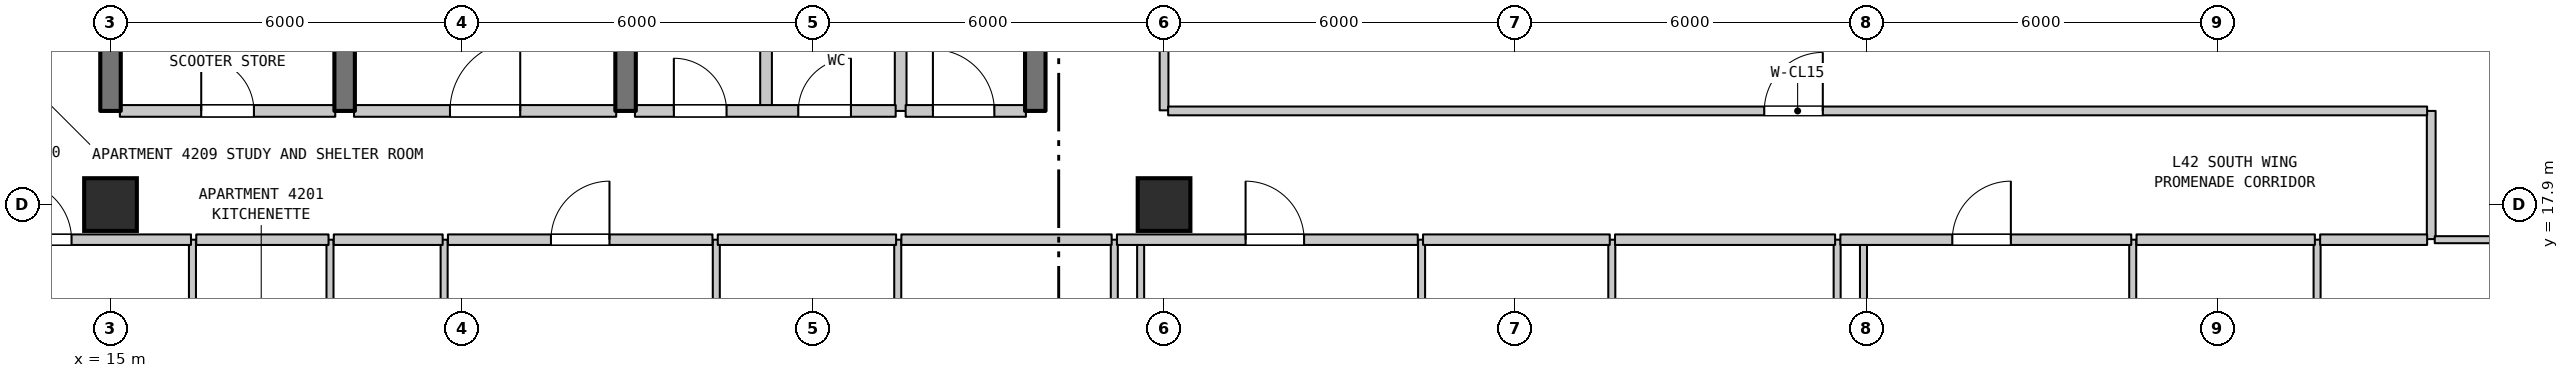
"""IFC4 building model, lengths in metres.
Left out: names, types, materials, properties, quantities, classifications, styles, units other than length and angle.
Written with IfcOpenShell. Run it as: python <this file> out.ifc"""

import sys

from ifc_helpers import new_model, si_unit, direction, frame, frame_2d, origin, origin_2d, place, context, subcontext, project, spatial, rectangle, extrude, element, fill, save


model = new_model("IFC4")
c1 = context("Model", 3, precision=1e-05, world=origin(), true_north=direction((0.0, 1.0)))
c2 = subcontext(c1, "Body", "Model", "MODEL_VIEW")
j1 = project(units=[si_unit("LENGTHUNIT", "METRE"), si_unit("PLANEANGLEUNIT", "RADIAN")], contexts=[c1])
p1 = place(None, origin())
s1 = spatial("IfcSite", under=j1, at=p1, CompositionType="ELEMENT")
p2 = place(p1, origin())
s2 = spatial("IfcBuilding", under=s1, at=p2, CompositionType="ELEMENT")
p3 = place(p2, frame((0.0, 0.0, 172.8)))
s3 = spatial("IfcBuildingStorey", under=s2, at=p3, CompositionType="ELEMENT", Elevation=172.8)
for number, where, z_axis, x_axis in (
    (1, (15.0, 17.9, 0.0), (0.0, 0.0, 1.0), (1.0, 0.0, 0.0)),
    (2, (33.0, 17.9, 0.0), (0.0, 0.0, 1.0), (1.0, 0.0, 0.0)),
):
    element("IfcColumn", number, at=place(p3, frame(where, z_axis=z_axis, x_axis=x_axis)), inside=s3, PredefinedType="COLUMN", context=c2, shape_type="SweptSolid", body=[
        extrude(rectangle(XDim=0.9, YDim=0.9, at=origin_2d()), origin(), (0.0, 0.0, 1.0), 3.7),
    ])
p4 = place(p3, frame((15.0, 19.5, 0.0), z_axis=(0.0, 0.0, 1.0), x_axis=(0.0, 1.0, 0.0)))
e3 = element("IfcWall", 3, at=p4, inside=s3, PredefinedType="SHEAR", context=c2, shape_type="SweptSolid", body=[
    extrude(rectangle(XDim=3.2, YDim=0.35, at=frame_2d((1.6, 0.0))), origin(), (0.0, 0.0, 1.0), 3.39),
])
p5 = place(p3, frame((16.4, 14.1, 0.0), z_axis=(0.0, 0.0, 1.0), x_axis=(0.0, 1.0, 0.0)))
e4 = element("IfcWall", 4, at=p5, inside=s3, PredefinedType="PARTITIONING", context=c2, shape_type="SweptSolid", body=[
    extrude(rectangle(XDim=3.2, YDim=0.12, at=frame_2d((1.6, 0.0))), origin(), (0.0, 0.0, 1.0), 3.39),
])
p6 = place(p5, frame((1.15, 0.0, 0.0)))
e5 = element("IfcOpeningElement", 5, at=p6, cuts=e4, PredefinedType="OPENING", context=c2, shape_type="SweptSolid", body=[
    extrude(rectangle(XDim=0.9, YDim=2.15, at=frame_2d((0.45, 1.075))), frame((0.0, 0.07, 0.0), z_axis=(0.0, -1.0, 0.0), x_axis=(1.0, 0.0, 0.0)), (0.0, 0.0, 1.0), 0.14),
])
p7 = place(p3, frame((18.75, 14.1, 0.0), z_axis=(0.0, 0.0, 1.0), x_axis=(0.0, 1.0, 0.0)))
e6 = element("IfcWall", 6, at=p7, inside=s3, PredefinedType="PARTITIONING", context=c2, shape_type="SweptSolid", body=[
    extrude(rectangle(XDim=3.2, YDim=0.12, at=frame_2d((1.6, 0.0))), origin(), (0.0, 0.0, 1.0), 3.39),
])
p8 = place(p3, frame((19.0, 19.5, 0.0), z_axis=(0.0, 0.0, 1.0), x_axis=(0.0, 1.0, 0.0)))
e7 = element("IfcWall", 7, at=p8, inside=s3, PredefinedType="SHEAR", context=c2, shape_type="SweptSolid", body=[
    extrude(rectangle(XDim=3.2, YDim=0.35, at=frame_2d((1.6, 0.0))), origin(), (0.0, 0.0, 1.0), 3.39),
])
p9 = place(p3, frame((20.7, 6.977, 0.0), z_axis=(0.0, 0.0, 1.0), x_axis=(0.0, 1.0, 0.0)))
e8 = element("IfcWall", 8, at=p9, inside=s3, PredefinedType="PARTITIONING", context=c2, shape_type="SweptSolid", body=[
    extrude(rectangle(XDim=10.323, YDim=0.12, at=frame_2d((5.162, 0.0))), origin(), (0.0, 0.0, 1.0), 3.39),
])
p10 = place(p3, frame((23.8, 19.5, 0.0), z_axis=(0.0, 0.0, 1.0), x_axis=(0.0, 1.0, 0.0)))
e9 = element("IfcWall", 9, at=p10, inside=s3, PredefinedType="SHEAR", context=c2, shape_type="SweptSolid", body=[
    extrude(rectangle(XDim=3.2, YDim=0.35, at=frame_2d((1.6, 0.0))), origin(), (0.0, 0.0, 1.0), 3.39),
])
p11 = place(p3, frame((25.35, 11.15, 0.0), z_axis=(0.0, 0.0, 1.0), x_axis=(0.0, 1.0, 0.0)))
e10 = element("IfcWall", 10, at=p11, inside=s3, PredefinedType="PARTITIONING", context=c2, shape_type="SweptSolid", body=[
    extrude(rectangle(XDim=6.15, YDim=0.12, at=frame_2d((3.075, 0.0))), origin(), (0.0, 0.0, 1.0), 3.39),
])
p12 = place(p3, frame((26.2, 19.5, 0.0), z_axis=(0.0, 0.0, 1.0), x_axis=(0.0, 1.0, 0.0)))
e11 = element("IfcWall", 11, at=p12, inside=s3, PredefinedType="STANDARD", context=c2, shape_type="SweptSolid", body=[
    extrude(rectangle(XDim=3.2, YDim=0.2, at=frame_2d((1.6, 0.0))), origin(), (0.0, 0.0, 1.0), 3.39),
])
p13 = place(p3, frame((28.45, 11.15, 0.0), z_axis=(0.0, 0.0, 1.0), x_axis=(0.0, 1.0, 0.0)))
e12 = element("IfcWall", 12, at=p13, inside=s3, PredefinedType="PARTITIONING", context=c2, shape_type="SweptSolid", body=[
    extrude(rectangle(XDim=6.15, YDim=0.12, at=frame_2d((3.075, 0.0))), origin(), (0.0, 0.0, 1.0), 3.39),
])
p14 = place(p3, frame((28.5, 19.5, 0.0), z_axis=(0.0, 0.0, 1.0), x_axis=(0.0, 1.0, 0.0)))
e13 = element("IfcWall", 13, at=p14, inside=s3, PredefinedType="STANDARD", context=c2, shape_type="SweptSolid", body=[
    extrude(rectangle(XDim=3.2, YDim=0.2, at=frame_2d((1.6, 0.0))), origin(), (0.0, 0.0, 1.0), 3.39),
])
p15 = place(p3, frame((30.8, 19.5, 0.0), z_axis=(0.0, 0.0, 1.0), x_axis=(0.0, 1.0, 0.0)))
e14 = element("IfcWall", 14, at=p15, inside=s3, PredefinedType="SHEAR", context=c2, shape_type="SweptSolid", body=[
    extrude(rectangle(XDim=3.2, YDim=0.35, at=frame_2d((1.6, 0.0))), origin(), (0.0, 0.0, 1.0), 3.39),
])
p16 = place(p3, frame((32.15, 11.15, 0.0), z_axis=(0.0, 0.0, 1.0), x_axis=(0.0, 1.0, 0.0)))
e15 = element("IfcWall", 15, at=p16, inside=s3, PredefinedType="PARTITIONING", context=c2, shape_type="SweptSolid", body=[
    extrude(rectangle(XDim=6.15, YDim=0.12, at=frame_2d((3.075, 0.0))), origin(), (0.0, 0.0, 1.0), 3.39),
])
p17 = place(p3, frame((32.6, 14.85, 0.0), z_axis=(0.0, 0.0, 1.0), x_axis=(0.0, 1.0, 0.0)))
e16 = element("IfcWall", 16, at=p17, inside=s3, PredefinedType="PARTITIONING", context=c2, shape_type="SweptSolid", body=[
    extrude(rectangle(XDim=2.45, YDim=0.12, at=frame_2d((1.225, 0.0))), origin(), (0.0, 0.0, 1.0), 3.39),
])
p18 = place(p3, frame((33.0, 19.51, 0.0), z_axis=(0.0, 0.0, 1.0), x_axis=(0.0, 1.0, 0.0)))
e17 = element("IfcWall", 17, at=p18, inside=s3, PredefinedType="STANDARD", context=c2, shape_type="SweptSolid", body=[
    extrude(rectangle(XDim=5.99, YDim=0.15, at=frame_2d((2.995, 0.0))), origin(), (0.0, 0.0, 1.0), 2.99),
])
p19 = place(p18, frame((1.513, 0.0, 0.0)))
e18 = element("IfcOpeningElement", 18, at=p19, cuts=e17, PredefinedType="OPENING", context=c2, shape_type="SweptSolid", body=[
    extrude(rectangle(XDim=1.0, YDim=2.15, at=frame_2d((0.5, 1.075))), frame((0.0, 0.085, 0.0), z_axis=(0.0, -1.0, 0.0), x_axis=(1.0, 0.0, 0.0)), (0.0, 0.0, 1.0), 0.17),
])
for number, where, z_axis, x_axis in (
    (19, (37.4, 11.15, 0.0), (0.0, 0.0, 1.0), (0.0, 1.0, 0.0)),
    (20, (40.65, 11.15, 0.0), (0.0, 0.0, 1.0), (0.0, 1.0, 0.0)),
    (21, (44.5, 11.15, 0.0), (0.0, 0.0, 1.0), (0.0, 1.0, 0.0)),
):
    element("IfcWall", number, at=place(p3, frame(where, z_axis=z_axis, x_axis=x_axis)), inside=s3, PredefinedType="PARTITIONING", context=c2, shape_type="SweptSolid", body=[
        extrude(rectangle(XDim=6.15, YDim=0.12, at=frame_2d((3.075, 0.0))), origin(), (0.0, 0.0, 1.0), 3.39),
    ])
p20 = place(p3, frame((44.95, 0.71, 0.0), z_axis=(0.0, 0.0, 1.0), x_axis=(0.0, 1.0, 0.0)))
e22 = element("IfcWall", 22, at=p20, inside=s3, PredefinedType="PARTITIONING", context=c2, shape_type="SweptSolid", body=[
    extrude(rectangle(XDim=16.59, YDim=0.12, at=frame_2d((8.295, 0.0))), origin(), (0.0, 0.0, 1.0), 3.39),
])
for number, where, z_axis, x_axis in (
    (23, (49.55, 11.15, 0.0), (0.0, 0.0, 1.0), (0.0, 1.0, 0.0)),
    (24, (52.7, 11.15, 0.0), (0.0, 0.0, 1.0), (0.0, 1.0, 0.0)),
):
    element("IfcWall", number, at=place(p3, frame(where, z_axis=z_axis, x_axis=x_axis)), inside=s3, PredefinedType="PARTITIONING", context=c2, shape_type="SweptSolid", body=[
        extrude(rectangle(XDim=6.15, YDim=0.12, at=frame_2d((3.075, 0.0))), origin(), (0.0, 0.0, 1.0), 3.39),
    ])
p21 = place(p3, frame((54.65, 17.31, 0.0), z_axis=(0.0, 0.0, 1.0), x_axis=(0.0, 1.0, 0.0)))
e25 = element("IfcWall", 25, at=p21, inside=s3, PredefinedType="STANDARD", context=c2, shape_type="SweptSolid", body=[
    extrude(rectangle(XDim=2.19, YDim=0.15, at=frame_2d((1.095, 0.0))), origin(), (0.0, 0.0, 1.0), 3.39),
])
p22 = place(p3, frame((12.875, 17.3, 0.0), z_axis=(0.0, 0.0, 1.0), x_axis=(1.0, 0.0, 0.0)))
e26 = element("IfcWall", 26, at=p22, inside=s3, PredefinedType="STANDARD", context=c2, shape_type="SweptSolid", body=[
    extrude(rectangle(XDim=3.5, YDim=0.18, at=frame_2d((1.75, 0.0))), origin(), (0.0, 0.0, 1.0), 3.39),
])
p23 = place(p22, frame((0.459, 0.0, 0.0)))
e27 = element("IfcOpeningElement", 27, at=p23, cuts=e26, PredefinedType="OPENING", context=c2, shape_type="SweptSolid", body=[
    extrude(rectangle(XDim=1.0, YDim=2.15, at=frame_2d((0.5, 1.075))), frame((0.0, 0.1, 0.0), z_axis=(0.0, -1.0, 0.0), x_axis=(1.0, 0.0, 0.0)), (0.0, 0.0, 1.0), 0.2),
])
p24 = place(p3, frame((16.465, 17.3, 0.0), z_axis=(0.0, 0.0, 1.0), x_axis=(1.0, 0.0, 0.0)))
e28 = element("IfcWall", 28, at=p24, inside=s3, PredefinedType="STANDARD", context=c2, shape_type="SweptSolid", body=[
    extrude(rectangle(XDim=2.26, YDim=0.18, at=frame_2d((1.13, 0.0))), origin(), (0.0, 0.0, 1.0), 3.39),
])
p25 = place(p3, frame((18.815, 17.3, 0.0), z_axis=(0.0, 0.0, 1.0), x_axis=(1.0, 0.0, 0.0)))
e29 = element("IfcWall", 29, at=p25, inside=s3, PredefinedType="STANDARD", context=c2, shape_type="SweptSolid", body=[
    extrude(rectangle(XDim=1.86, YDim=0.18, at=frame_2d((0.93, 0.0))), origin(), (0.0, 0.0, 1.0), 3.39),
])
p26 = place(p3, frame((20.765, 17.3, 0.0), z_axis=(0.0, 0.0, 1.0), x_axis=(1.0, 0.0, 0.0)))
e30 = element("IfcWall", 30, at=p26, inside=s3, PredefinedType="STANDARD", context=c2, shape_type="SweptSolid", body=[
    extrude(rectangle(XDim=4.52, YDim=0.18, at=frame_2d((2.26, 0.0))), origin(), (0.0, 0.0, 1.0), 3.39),
])
p27 = place(p26, frame((1.76, 0.0, 0.0)))
e31 = element("IfcOpeningElement", 31, at=p27, cuts=e30, PredefinedType="OPENING", context=c2, shape_type="SweptSolid", body=[
    extrude(rectangle(XDim=1.0, YDim=2.15, at=frame_2d((0.5, 1.075))), frame((0.0, 0.1, 0.0), z_axis=(0.0, -1.0, 0.0), x_axis=(1.0, 0.0, 0.0)), (0.0, 0.0, 1.0), 0.2),
])
p28 = place(p3, frame((25.375, 17.3, 0.0), z_axis=(0.0, 0.0, 1.0), x_axis=(1.0, 0.0, 0.0)))
e32 = element("IfcWall", 32, at=p28, inside=s3, PredefinedType="STANDARD", context=c2, shape_type="SweptSolid", body=[
    extrude(rectangle(XDim=3.047, YDim=0.18, at=frame_2d((1.523, 0.0))), origin(), (0.0, 0.0, 1.0), 3.39),
])
p29 = place(p3, frame((28.512, 17.3, 0.0), z_axis=(0.0, 0.0, 1.0), x_axis=(1.0, 0.0, 0.0)))
e33 = element("IfcWall", 33, at=p29, inside=s3, PredefinedType="STANDARD", context=c2, shape_type="SweptSolid", body=[
    extrude(rectangle(XDim=3.593, YDim=0.18, at=frame_2d((1.796, 0.0))), origin(), (0.0, 0.0, 1.0), 3.39),
])
p30 = place(p3, frame((32.195, 17.3, 0.0), z_axis=(0.0, 0.0, 1.0), x_axis=(1.0, 0.0, 0.0)))
e34 = element("IfcWall", 34, at=p30, inside=s3, PredefinedType="STANDARD", context=c2, shape_type="SweptSolid", body=[
    extrude(rectangle(XDim=5.14, YDim=0.18, at=frame_2d((2.57, 0.0))), origin(), (0.0, 0.0, 1.0), 3.39),
])
p31 = place(p30, frame((2.198, 0.0, 0.0)))
e35 = element("IfcOpeningElement", 35, at=p31, cuts=e34, PredefinedType="OPENING", context=c2, shape_type="SweptSolid", body=[
    extrude(rectangle(XDim=1.0, YDim=2.15, at=frame_2d((0.5, 1.075))), frame((0.0, 0.1, 0.0), z_axis=(0.0, -1.0, 0.0), x_axis=(1.0, 0.0, 0.0)), (0.0, 0.0, 1.0), 0.2),
])
p32 = place(p3, frame((37.425, 17.3, 0.0), z_axis=(0.0, 0.0, 1.0), x_axis=(1.0, 0.0, 0.0)))
e36 = element("IfcWall", 36, at=p32, inside=s3, PredefinedType="STANDARD", context=c2, shape_type="SweptSolid", body=[
    extrude(rectangle(XDim=3.19, YDim=0.18, at=frame_2d((1.595, 0.0))), origin(), (0.0, 0.0, 1.0), 3.39),
])
p33 = place(p3, frame((40.705, 17.3, 0.0), z_axis=(0.0, 0.0, 1.0), x_axis=(1.0, 0.0, 0.0)))
e37 = element("IfcWall", 37, at=p33, inside=s3, PredefinedType="STANDARD", context=c2, shape_type="SweptSolid", body=[
    extrude(rectangle(XDim=3.76, YDim=0.18, at=frame_2d((1.88, 0.0))), origin(), (0.0, 0.0, 1.0), 3.39),
])
p34 = place(p3, frame((44.555, 17.3, 0.0), z_axis=(0.0, 0.0, 1.0), x_axis=(1.0, 0.0, 0.0)))
e38 = element("IfcWall", 38, at=p34, inside=s3, PredefinedType="STANDARD", context=c2, shape_type="SweptSolid", body=[
    extrude(rectangle(XDim=4.97, YDim=0.18, at=frame_2d((2.485, 0.0))), origin(), (0.0, 0.0, 1.0), 3.39),
])
p35 = place(p34, frame((1.913, 0.0, 0.0)))
e39 = element("IfcOpeningElement", 39, at=p35, cuts=e38, PredefinedType="OPENING", context=c2, shape_type="SweptSolid", body=[
    extrude(rectangle(XDim=1.0, YDim=2.15, at=frame_2d((0.5, 1.075))), frame((0.0, 0.1, 0.0), z_axis=(0.0, -1.0, 0.0), x_axis=(1.0, 0.0, 0.0)), (0.0, 0.0, 1.0), 0.2),
])
p36 = place(p3, frame((49.615, 17.3, 0.0), z_axis=(0.0, 0.0, 1.0), x_axis=(1.0, 0.0, 0.0)))
e40 = element("IfcWall", 40, at=p36, inside=s3, PredefinedType="STANDARD", context=c2, shape_type="SweptSolid", body=[
    extrude(rectangle(XDim=3.047, YDim=0.18, at=frame_2d((1.523, 0.0))), origin(), (0.0, 0.0, 1.0), 3.39),
])
p37 = place(p3, frame((52.752, 17.3, 0.0), z_axis=(0.0, 0.0, 1.0), x_axis=(1.0, 0.0, 0.0)))
e41 = element("IfcWall", 41, at=p37, inside=s3, PredefinedType="STANDARD", context=c2, shape_type="SweptSolid", body=[
    extrude(rectangle(XDim=1.828, YDim=0.18, at=frame_2d((0.914, 0.0))), origin(), (0.0, 0.0, 1.0), 3.39),
])
p38 = place(p3, frame((54.71, 17.3, 0.0), z_axis=(0.0, 0.0, 1.0), x_axis=(1.0, 0.0, 0.0)))
e42 = element("IfcWall", 42, at=p38, inside=s3, PredefinedType="PARTITIONING", context=c2, shape_type="SweptSolid", body=[
    extrude(rectangle(XDim=1.635, YDim=0.12, at=frame_2d((0.817, 0.0))), origin(), (0.0, 0.0, 1.0), 3.39),
])
p39 = place(p3, frame((15.16, 19.5, 0.0), z_axis=(0.0, 0.0, 1.0), x_axis=(1.0, 0.0, 0.0)))
e43 = element("IfcWall", 43, at=p39, inside=s3, PredefinedType="STANDARD", context=c2, shape_type="SweptSolid", body=[
    extrude(rectangle(XDim=3.68, YDim=0.2, at=frame_2d((1.84, 0.0))), origin(), (0.0, 0.0, 1.0), 3.39),
])
p40 = place(p39, frame((1.39, 0.0, 0.0)))
e44 = element("IfcOpeningElement", 44, at=p40, cuts=e43, PredefinedType="OPENING", context=c2, shape_type="SweptSolid", body=[
    extrude(rectangle(XDim=0.9, YDim=2.15, at=frame_2d((0.45, 1.075))), frame((0.0, 0.11, 0.0), z_axis=(0.0, -1.0, 0.0), x_axis=(1.0, 0.0, 0.0)), (0.0, 0.0, 1.0), 0.22),
])
p41 = place(p3, frame((19.16, 19.5, 0.0), z_axis=(0.0, 0.0, 1.0), x_axis=(1.0, 0.0, 0.0)))
e45 = element("IfcWall", 45, at=p41, inside=s3, PredefinedType="STANDARD", context=c2, shape_type="SweptSolid", body=[
    extrude(rectangle(XDim=4.48, YDim=0.2, at=frame_2d((2.24, 0.0))), origin(), (0.0, 0.0, 1.0), 3.39),
])
p42 = place(p41, frame((1.64, 0.0, 0.0)))
e46 = element("IfcOpeningElement", 46, at=p42, cuts=e45, PredefinedType="OPENING", context=c2, shape_type="SweptSolid", body=[
    extrude(rectangle(XDim=1.2, YDim=2.2, at=frame_2d((0.6, 1.1))), frame((0.0, 0.11, 0.0), z_axis=(0.0, -1.0, 0.0), x_axis=(1.0, 0.0, 0.0)), (0.0, 0.0, 1.0), 0.22),
])
p43 = place(p3, frame((23.96, 19.5, 0.0), z_axis=(0.0, 0.0, 1.0), x_axis=(1.0, 0.0, 0.0)))
e47 = element("IfcWall", 47, at=p43, inside=s3, PredefinedType="STANDARD", context=c2, shape_type="SweptSolid", body=[
    extrude(rectangle(XDim=4.455, YDim=0.2, at=frame_2d((2.228, 0.0))), origin(), (0.0, 0.0, 1.0), 3.39),
])
p44 = place(p43, frame((0.665, 0.0, 0.0)))
e48 = element("IfcOpeningElement", 48, at=p44, cuts=e47, PredefinedType="OPENING", context=c2, shape_type="SweptSolid", body=[
    extrude(rectangle(XDim=0.9, YDim=2.15, at=frame_2d((0.45, 1.075))), frame((0.0, 0.11, 0.0), z_axis=(0.0, -1.0, 0.0), x_axis=(1.0, 0.0, 0.0)), (0.0, 0.0, 1.0), 0.22),
])
p45 = place(p43, frame((2.791, 0.0, 0.0)))
e49 = element("IfcOpeningElement", 49, at=p45, cuts=e47, PredefinedType="OPENING", context=c2, shape_type="SweptSolid", body=[
    extrude(rectangle(XDim=0.9, YDim=2.15, at=frame_2d((0.45, 1.075))), frame((0.0, 0.11, 0.0), z_axis=(0.0, -1.0, 0.0), x_axis=(1.0, 0.0, 0.0)), (0.0, 0.0, 1.0), 0.22),
])
p46 = place(p3, frame((28.585, 19.5, 0.0), z_axis=(0.0, 0.0, 1.0), x_axis=(1.0, 0.0, 0.0)))
e50 = element("IfcWall", 50, at=p46, inside=s3, PredefinedType="STANDARD", context=c2, shape_type="SweptSolid", body=[
    extrude(rectangle(XDim=2.055, YDim=0.2, at=frame_2d((1.027, 0.0))), origin(), (0.0, 0.0, 1.0), 3.39),
])
p47 = place(p46, frame((0.466, 0.0, 0.0)))
e51 = element("IfcOpeningElement", 51, at=p47, cuts=e50, PredefinedType="OPENING", context=c2, shape_type="SweptSolid", body=[
    extrude(rectangle(XDim=1.05, YDim=2.15, at=frame_2d((0.525, 1.075))), frame((0.0, 0.11, 0.0), z_axis=(0.0, -1.0, 0.0), x_axis=(1.0, 0.0, 0.0)), (0.0, 0.0, 1.0), 0.22),
])
p48 = place(p3, frame((33.07, 19.5, 0.0), z_axis=(0.0, 0.0, 1.0), x_axis=(1.0, 0.0, 0.0)))
e52 = element("IfcWall", 52, at=p48, inside=s3, PredefinedType="STANDARD", context=c2, shape_type="SweptSolid", body=[
    extrude(rectangle(XDim=21.51, YDim=0.15, at=frame_2d((10.755, 0.0))), origin(), (0.0, 0.0, 1.0), 3.39),
])
p49 = place(p48, frame((10.185, 0.0, 0.0)))
e53 = element("IfcOpeningElement", 53, at=p49, cuts=e52, PredefinedType="OPENING", context=c2, shape_type="SweptSolid", body=[
    extrude(rectangle(XDim=1.0, YDim=2.15, at=frame_2d((0.5, 1.075))), frame((0.0, 0.085, 0.0), z_axis=(0.0, -1.0, 0.0), x_axis=(1.0, 0.0, 0.0)), (0.0, 0.0, 1.0), 0.17),
])
p50 = place(p23, origin())
e54 = element("IfcDoor", 54, at=p50, inside=s3, OperationType="SINGLE_SWING_LEFT", PredefinedType="DOOR", context=c2, shape_type="SweptSolid", body=[
    extrude(rectangle(XDim=1.0, YDim=2.15, at=frame_2d((0.5, 1.075))), frame((0.0, 0.025, 0.0), z_axis=(0.0, -1.0, 0.0), x_axis=(1.0, 0.0, 0.0)), (0.0, 0.0, 1.0), 0.05),
])
fill(e27, e54)
p51 = place(p27, origin())
e55 = element("IfcDoor", 55, at=p51, inside=s3, OperationType="SINGLE_SWING_RIGHT", PredefinedType="DOOR", context=c2, shape_type="SweptSolid", body=[
    extrude(rectangle(XDim=1.0, YDim=2.15, at=frame_2d((0.5, 1.075))), frame((0.0, 0.025, 0.0), z_axis=(0.0, -1.0, 0.0), x_axis=(1.0, 0.0, 0.0)), (0.0, 0.0, 1.0), 0.05),
])
fill(e31, e55)
p52 = place(p31, origin())
e56 = element("IfcDoor", 56, at=p52, inside=s3, OperationType="SINGLE_SWING_LEFT", PredefinedType="DOOR", context=c2, shape_type="SweptSolid", body=[
    extrude(rectangle(XDim=1.0, YDim=2.15, at=frame_2d((0.5, 1.075))), frame((0.0, 0.025, 0.0), z_axis=(0.0, -1.0, 0.0), x_axis=(1.0, 0.0, 0.0)), (0.0, 0.0, 1.0), 0.05),
])
fill(e35, e56)
p53 = place(p35, origin())
e57 = element("IfcDoor", 57, at=p53, inside=s3, OperationType="SINGLE_SWING_RIGHT", PredefinedType="DOOR", context=c2, shape_type="SweptSolid", body=[
    extrude(rectangle(XDim=1.0, YDim=2.15, at=frame_2d((0.5, 1.075))), frame((0.0, 0.025, 0.0), z_axis=(0.0, -1.0, 0.0), x_axis=(1.0, 0.0, 0.0)), (0.0, 0.0, 1.0), 0.05),
])
fill(e39, e57)
p54 = place(p40, origin())
e58 = element("IfcDoor", 58, at=p54, inside=s3, OperationType="SINGLE_SWING_LEFT", PredefinedType="DOOR", context=c2, shape_type="SweptSolid", body=[
    extrude(rectangle(XDim=0.9, YDim=2.15, at=frame_2d((0.45, 1.075))), frame((0.0, 0.025, 0.0), z_axis=(0.0, -1.0, 0.0), x_axis=(1.0, 0.0, 0.0)), (0.0, 0.0, 1.0), 0.05),
])
fill(e44, e58)
p55 = place(p42, origin())
e59 = element("IfcDoor", 59, at=p55, inside=s3, OperationType="SINGLE_SWING_RIGHT", PredefinedType="DOOR", context=c2, shape_type="SweptSolid", body=[
    extrude(rectangle(XDim=1.2, YDim=2.2, at=frame_2d((0.6, 1.1))), frame((0.0, 0.025, 0.0), z_axis=(0.0, -1.0, 0.0), x_axis=(1.0, 0.0, 0.0)), (0.0, 0.0, 1.0), 0.05),
])
fill(e46, e59)
p56 = place(p44, origin())
e60 = element("IfcDoor", 60, at=p56, inside=s3, OperationType="SINGLE_SWING_LEFT", PredefinedType="DOOR", context=c2, shape_type="SweptSolid", body=[
    extrude(rectangle(XDim=0.9, YDim=2.15, at=frame_2d((0.45, 1.075))), frame((0.0, 0.025, 0.0), z_axis=(0.0, -1.0, 0.0), x_axis=(1.0, 0.0, 0.0)), (0.0, 0.0, 1.0), 0.05),
])
fill(e48, e60)
p57 = place(p45, origin())
e61 = element("IfcDoor", 61, at=p57, inside=s3, OperationType="SINGLE_SWING_RIGHT", PredefinedType="DOOR", context=c2, shape_type="SweptSolid", body=[
    extrude(rectangle(XDim=0.9, YDim=2.15, at=frame_2d((0.45, 1.075))), frame((0.0, 0.025, 0.0), z_axis=(0.0, -1.0, 0.0), x_axis=(1.0, 0.0, 0.0)), (0.0, 0.0, 1.0), 0.05),
])
fill(e49, e61)
p58 = place(p47, origin())
e62 = element("IfcDoor", 62, at=p58, inside=s3, OperationType="SINGLE_SWING_LEFT", PredefinedType="DOOR", context=c2, shape_type="SweptSolid", body=[
    extrude(rectangle(XDim=1.05, YDim=2.15, at=frame_2d((0.525, 1.075))), frame((0.0, 0.025, 0.0), z_axis=(0.0, -1.0, 0.0), x_axis=(1.0, 0.0, 0.0)), (0.0, 0.0, 1.0), 0.05),
])
fill(e51, e62)
p59 = place(p49, origin())
e63 = element("IfcDoor", 63, at=p59, inside=s3, OperationType="SINGLE_SWING_RIGHT", PredefinedType="DOOR", context=c2, shape_type="SweptSolid", body=[
    extrude(rectangle(XDim=1.0, YDim=2.15, at=frame_2d((0.5, 1.075))), frame((0.0, 0.025, 0.0), z_axis=(0.0, -1.0, 0.0), x_axis=(1.0, 0.0, 0.0)), (0.0, 0.0, 1.0), 0.05),
])
fill(e53, e63)
save(model, sys.argv[1])
